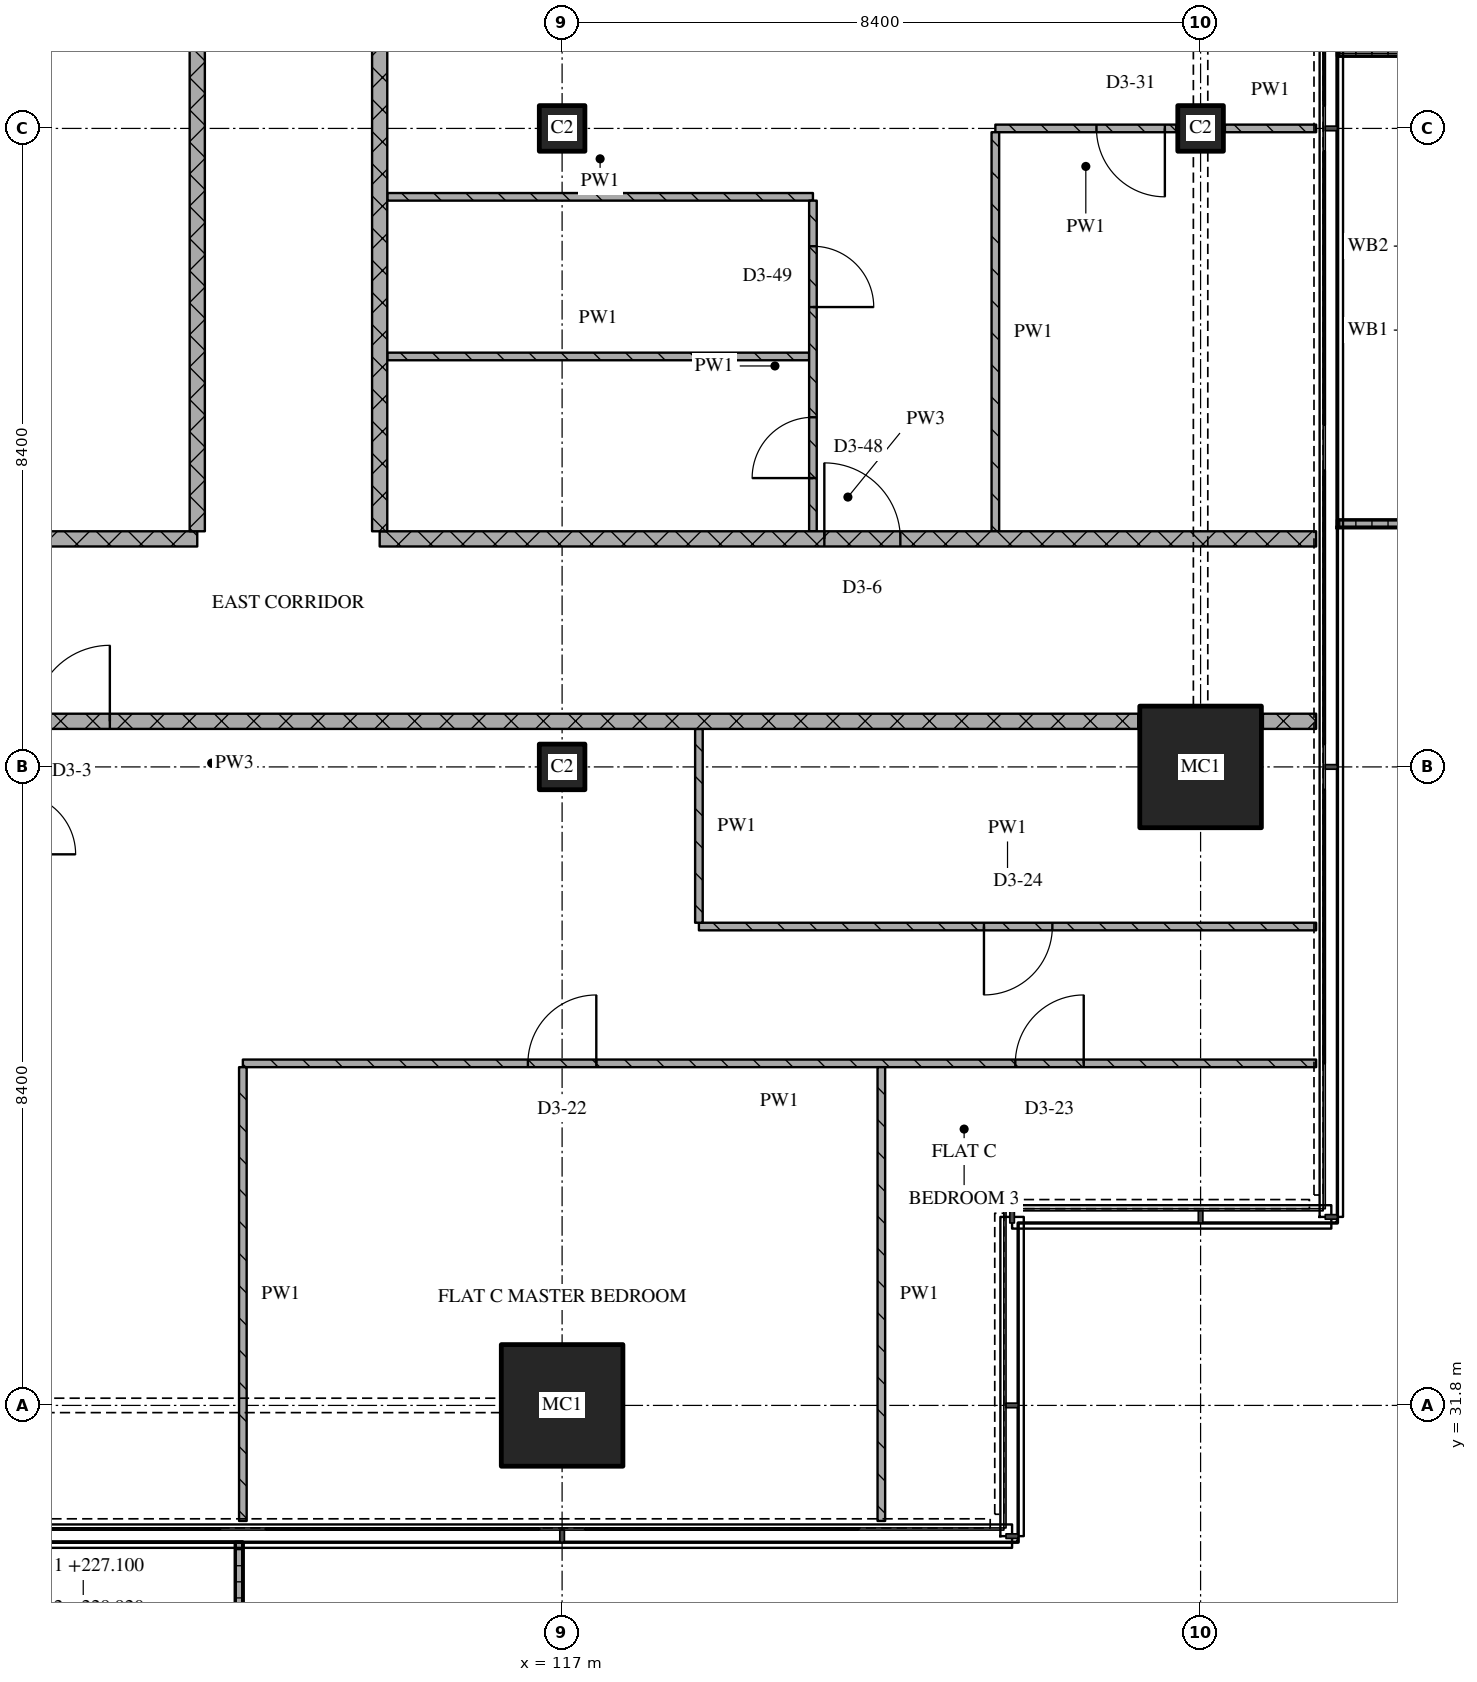
"""IFC4 building model, lengths in metres.
Left out: names, types, materials, properties, quantities, classifications, styles, units other than length and angle.
Written with IfcOpenShell. Run it as: python <this file> out.ifc"""

import sys

from ifc_helpers import new_model, si_unit, direction, frame, frame_2d, origin, origin_2d, place, context, subcontext, project, spatial, polyline, rectangle, outline, extrude, element, fill, save


model = new_model("IFC4")
c1 = context("Model", 3, precision=1e-05, world=origin(), true_north=direction((0.0, 1.0)))
c2 = subcontext(c1, "Body", "Model", "MODEL_VIEW")
j1 = project(units=[si_unit("LENGTHUNIT", "METRE"), si_unit("PLANEANGLEUNIT", "RADIAN")], contexts=[c1])
p1 = place(None, origin())
s1 = spatial("IfcSite", under=j1, at=p1, CompositionType="ELEMENT")
p2 = place(p1, origin())
s2 = spatial("IfcBuilding", under=s1, at=p2, CompositionType="ELEMENT")
p3 = place(p2, frame((0.0, 0.0, 227.1)))
s3 = spatial("IfcBuildingStorey", under=s2, at=p3, CompositionType="ELEMENT", Elevation=227.1)
p4 = place(p3, frame((117.0, 31.8, 0.0), z_axis=(0.0, 0.0, 1.0), x_axis=(1.0, 0.0, 0.0)))
e1 = element("IfcColumn", 1, at=p4, inside=s3, PredefinedType="COLUMN", context=c2, shape_type="SweptSolid", body=[
    extrude(rectangle(XDim=1.6, YDim=1.6, at=origin_2d()), origin(), (0.0, 0.0, 1.0), 3.6),
])
for number, where, z_axis, x_axis in (
    (2, (117.0, 40.2, 0.0), (0.0, 0.0, 1.0), (1.0, 0.0, 0.0)),
    (3, (117.0, 48.6, 0.0), (0.0, 0.0, 1.0), (1.0, 0.0, 0.0)),
):
    element("IfcColumn", number, at=place(p3, frame(where, z_axis=z_axis, x_axis=x_axis)), inside=s3, PredefinedType="COLUMN", context=c2, shape_type="SweptSolid", body=[
        extrude(rectangle(XDim=0.6, YDim=0.6, at=origin_2d()), origin(), (0.0, 0.0, 1.0), 3.6),
    ])
p5 = place(p3, frame((125.4, 40.2, 0.0), z_axis=(0.0, 0.0, 1.0), x_axis=(1.0, 0.0, 0.0)))
e4 = element("IfcColumn", 4, at=p5, inside=s3, PredefinedType="COLUMN", context=c2, shape_type="SweptSolid", body=[
    extrude(rectangle(XDim=1.6, YDim=1.6, at=origin_2d()), origin(), (0.0, 0.0, 1.0), 3.6),
])
p6 = place(p3, frame((125.4, 48.6, 0.0), z_axis=(0.0, 0.0, 1.0), x_axis=(1.0, 0.0, 0.0)))
e5 = element("IfcColumn", 5, at=p6, inside=s3, PredefinedType="COLUMN", context=c2, shape_type="SweptSolid", body=[
    extrude(rectangle(XDim=0.6, YDim=0.6, at=origin_2d()), origin(), (0.0, 0.0, 1.0), 3.6),
])
p7 = place(p3, origin())
e6 = element("IfcWall", 6, at=p7, inside=s3, PredefinedType="SOLIDWALL", context=c2, shape_type="SweptSolid", body=[
    extrude(outline(polyline([(108.6, 30.0), (108.7, 30.0), (108.7, 28.367), (112.7, 28.367), (112.7, 30.0), (112.8, 30.0), (112.8, 28.267), (108.6, 28.267), (108.6, 30.0)])), origin(), (0.0, 0.0, 1.0), 1.0),
])
p8 = place(p3, origin())
e7 = element("IfcWall", 7, at=p8, inside=s3, PredefinedType="SOLIDWALL", context=c2, shape_type="SweptSolid", body=[
    extrude(outline(polyline([(127.2, 43.35), (127.2, 43.45), (128.967, 43.45), (128.967, 49.55), (127.2, 49.55), (127.2, 49.65), (129.067, 49.65), (129.067, 43.35), (127.2, 43.35)])), origin(), (0.0, 0.0, 1.0), 1.0),
])
p9 = place(p3, frame((126.92, 36.3, 0.0), z_axis=(0.0, 0.0, 1.0), x_axis=(-1.0, 0.0, 0.0)))
e8 = element("IfcWall", 8, at=p9, inside=s3, PredefinedType="PARTITIONING", context=c2, shape_type="SweptSolid", body=[
    extrude(rectangle(XDim=14.12, YDim=0.1, at=frame_2d((7.06, 0.0))), origin(), (0.0, 0.0, 1.0), 3.32),
])
p10 = place(p9, frame((3.058, 0.0, 0.0)))
e9 = element("IfcOpeningElement", 9, at=p10, cuts=e8, PredefinedType="OPENING", context=c2, shape_type="SweptSolid", body=[
    extrude(rectangle(XDim=0.9, YDim=2.1, at=frame_2d((0.45, 1.05))), frame((0.0, 0.06, 0.0), z_axis=(0.0, -1.0, 0.0), x_axis=(1.0, 0.0, 0.0)), (0.0, 0.0, 1.0), 0.12),
])
p11 = place(p9, frame((9.47, 0.0, 0.0)))
e10 = element("IfcOpeningElement", 10, at=p11, cuts=e8, PredefinedType="OPENING", context=c2, shape_type="SweptSolid", body=[
    extrude(rectangle(XDim=0.9, YDim=2.1, at=frame_2d((0.45, 1.05))), frame((0.0, 0.06, 0.0), z_axis=(0.0, -1.0, 0.0), x_axis=(1.0, 0.0, 0.0)), (0.0, 0.0, 1.0), 0.12),
])
p12 = place(p3, frame((118.8, 38.1, 0.0), z_axis=(0.0, 0.0, 1.0), x_axis=(1.0, 0.0, 0.0)))
e11 = element("IfcWall", 11, at=p12, inside=s3, PredefinedType="PARTITIONING", context=c2, shape_type="SweptSolid", body=[
    extrude(rectangle(XDim=8.12, YDim=0.1, at=frame_2d((4.06, 0.0))), origin(), (0.0, 0.0, 1.0), 3.32),
])
p13 = place(p12, frame((3.75, 0.0, 0.0)))
e12 = element("IfcOpeningElement", 12, at=p13, cuts=e11, PredefinedType="OPENING", context=c2, shape_type="SweptSolid", body=[
    extrude(rectangle(XDim=0.9, YDim=2.1, at=frame_2d((0.45, 1.05))), frame((0.0, 0.06, 0.0), z_axis=(0.0, -1.0, 0.0), x_axis=(1.0, 0.0, 0.0)), (0.0, 0.0, 1.0), 0.12),
])
p14 = place(p3, frame((124.58, 40.8, 0.0), z_axis=(0.0, 0.0, 1.0), x_axis=(-1.0, 0.0, 0.0)))
e13 = element("IfcWall", 13, at=p14, inside=s3, PredefinedType="PARTITIONING", context=c2, shape_type="SweptSolid", body=[
    extrude(rectangle(XDim=24.38, YDim=0.2, at=frame_2d((12.19, 0.0))), origin(), (0.0, 0.0, 1.0), 3.32),
])
p15 = place(p14, frame((13.53, 0.0, 0.0)))
e14 = element("IfcOpeningElement", 14, at=p15, cuts=e13, PredefinedType="OPENING", context=c2, shape_type="SweptSolid", body=[
    extrude(rectangle(XDim=1.0, YDim=2.1, at=frame_2d((0.5, 1.05))), frame((0.0, 0.11, 0.0), z_axis=(0.0, -1.0, 0.0), x_axis=(1.0, 0.0, 0.0)), (0.0, 0.0, 1.0), 0.22),
])
p16 = place(p3, frame((126.22, 40.8, 0.0), z_axis=(0.0, 0.0, 1.0), x_axis=(1.0, 0.0, 0.0)))
e15 = element("IfcWall", 15, at=p16, inside=s3, PredefinedType="PARTITIONING", context=c2, shape_type="SweptSolid", body=[
    extrude(rectangle(XDim=0.7, YDim=0.2, at=frame_2d((0.35, 0.0))), origin(), (0.0, 0.0, 1.0), 3.32),
])
p17 = place(p3, frame((107.0, 43.2, 0.0), z_axis=(0.0, 0.0, 1.0), x_axis=(1.0, 0.0, 0.0)))
e16 = element("IfcWall", 16, at=p17, inside=s3, PredefinedType="PARTITIONING", context=c2, shape_type="SweptSolid", body=[
    extrude(rectangle(XDim=5.2, YDim=0.2, at=frame_2d((2.6, 0.0))), origin(), (0.0, 0.0, 1.0), 3.32),
])
p18 = place(p17, frame((2.15, 0.0, 0.0)))
e17 = element("IfcOpeningElement", 17, at=p18, cuts=e16, PredefinedType="OPENING", context=c2, shape_type="SweptSolid", body=[
    extrude(rectangle(XDim=0.9, YDim=2.1, at=frame_2d((0.45, 1.05))), frame((0.0, 0.11, 0.0), z_axis=(0.0, -1.0, 0.0), x_axis=(1.0, 0.0, 0.0)), (0.0, 0.0, 1.0), 0.22),
])
p19 = place(p3, frame((114.6, 43.2, 0.0), z_axis=(0.0, 0.0, 1.0), x_axis=(1.0, 0.0, 0.0)))
e18 = element("IfcWall", 18, at=p19, inside=s3, PredefinedType="PARTITIONING", context=c2, shape_type="SweptSolid", body=[
    extrude(rectangle(XDim=12.32, YDim=0.2, at=frame_2d((6.16, 0.0))), origin(), (0.0, 0.0, 1.0), 3.32),
])
p20 = place(p19, frame((5.85, 0.0, 0.0)))
e19 = element("IfcOpeningElement", 19, at=p20, cuts=e18, PredefinedType="OPENING", context=c2, shape_type="SweptSolid", body=[
    extrude(rectangle(XDim=1.0, YDim=2.1, at=frame_2d((0.5, 1.05))), frame((0.0, 0.11, 0.0), z_axis=(0.0, -1.0, 0.0), x_axis=(1.0, 0.0, 0.0)), (0.0, 0.0, 1.0), 0.22),
])
p21 = place(p3, frame((114.7, 45.6, 0.0), z_axis=(0.0, 0.0, 1.0), x_axis=(1.0, 0.0, 0.0)))
e20 = element("IfcWall", 20, at=p21, inside=s3, PredefinedType="PARTITIONING", context=c2, shape_type="SweptSolid", body=[
    extrude(rectangle(XDim=5.55, YDim=0.1, at=frame_2d((2.775, 0.0))), origin(), (0.0, 0.0, 1.0), 3.32),
])
p22 = place(p3, frame((114.7, 47.7, 0.0), z_axis=(0.0, 0.0, 1.0), x_axis=(1.0, 0.0, 0.0)))
e21 = element("IfcWall", 21, at=p22, inside=s3, PredefinedType="PARTITIONING", context=c2, shape_type="SweptSolid", body=[
    extrude(rectangle(XDim=5.6, YDim=0.1, at=frame_2d((2.8, 0.0))), origin(), (0.0, 0.0, 1.0), 3.32),
])
p23 = place(p3, frame((125.08, 48.6, 0.0), z_axis=(0.0, 0.0, 1.0), x_axis=(-1.0, 0.0, 0.0)))
e22 = element("IfcWall", 22, at=p23, inside=s3, PredefinedType="PARTITIONING", context=c2, shape_type="SweptSolid", body=[
    extrude(rectangle(XDim=2.38, YDim=0.1, at=frame_2d((1.19, 0.0))), origin(), (0.0, 0.0, 1.0), 3.32),
])
p24 = place(p23, frame((0.15, 0.0, 0.0)))
e23 = element("IfcOpeningElement", 23, at=p24, cuts=e22, PredefinedType="OPENING", context=c2, shape_type="SweptSolid", body=[
    extrude(rectangle(XDim=0.9, YDim=2.1, at=frame_2d((0.45, 1.05))), frame((0.0, 0.06, 0.0), z_axis=(0.0, -1.0, 0.0), x_axis=(1.0, 0.0, 0.0)), (0.0, 0.0, 1.0), 0.12),
])
p25 = place(p3, frame((125.72, 48.6, 0.0), z_axis=(0.0, 0.0, 1.0), x_axis=(1.0, 0.0, 0.0)))
e24 = element("IfcWall", 24, at=p25, inside=s3, PredefinedType="PARTITIONING", context=c2, shape_type="SweptSolid", body=[
    extrude(rectangle(XDim=1.2, YDim=0.1, at=frame_2d((0.6, 0.0))), origin(), (0.0, 0.0, 1.0), 3.32),
])
p26 = place(p3, frame((112.2, 58.7, 0.0), z_axis=(0.0, 0.0, 1.0), x_axis=(0.0, -1.0, 0.0)))
e25 = element("IfcWall", 25, at=p26, inside=s3, PredefinedType="PARTITIONING", context=c2, shape_type="SweptSolid", body=[
    extrude(rectangle(XDim=15.4, YDim=0.2, at=frame_2d((7.7, 0.0))), origin(), (0.0, 0.0, 1.0), 3.32),
])
p27 = place(p3, frame((112.8, 36.25, 0.0), z_axis=(0.0, 0.0, 1.0), x_axis=(0.0, -1.0, 0.0)))
e26 = element("IfcWall", 26, at=p27, inside=s3, PredefinedType="PARTITIONING", context=c2, shape_type="SweptSolid", body=[
    extrude(rectangle(XDim=5.97, YDim=0.1, at=frame_2d((2.985, 0.0))), origin(), (0.0, 0.0, 1.0), 3.32),
])
p28 = place(p3, frame((114.6, 61.1, 0.0), z_axis=(0.0, 0.0, 1.0), x_axis=(0.0, -1.0, 0.0)))
e27 = element("IfcWall", 27, at=p28, inside=s3, PredefinedType="PARTITIONING", context=c2, shape_type="SweptSolid", body=[
    extrude(rectangle(XDim=17.8, YDim=0.2, at=frame_2d((8.9, 0.0))), origin(), (0.0, 0.0, 1.0), 3.32),
])
p29 = place(p3, frame((118.8, 40.7, 0.0), z_axis=(0.0, 0.0, 1.0), x_axis=(0.0, -1.0, 0.0)))
e28 = element("IfcWall", 28, at=p29, inside=s3, PredefinedType="PARTITIONING", context=c2, shape_type="SweptSolid", body=[
    extrude(rectangle(XDim=2.55, YDim=0.1, at=frame_2d((1.275, 0.0))), origin(), (0.0, 0.0, 1.0), 3.32),
])
p30 = place(p3, frame((120.3, 43.3, 0.0), z_axis=(0.0, 0.0, 1.0), x_axis=(0.0, 1.0, 0.0)))
e29 = element("IfcWall", 29, at=p30, inside=s3, PredefinedType="PARTITIONING", context=c2, shape_type="SweptSolid", body=[
    extrude(rectangle(XDim=4.35, YDim=0.1, at=frame_2d((2.175, 0.0))), origin(), (0.0, 0.0, 1.0), 3.32),
])
p31 = place(p30, frame((0.7, 0.0, 0.0)))
e30 = element("IfcOpeningElement", 30, at=p31, cuts=e29, PredefinedType="OPENING", context=c2, shape_type="SweptSolid", body=[
    extrude(rectangle(XDim=0.8, YDim=2.1, at=frame_2d((0.4, 1.05))), frame((0.0, 0.06, 0.0), z_axis=(0.0, -1.0, 0.0), x_axis=(1.0, 0.0, 0.0)), (0.0, 0.0, 1.0), 0.12),
])
p32 = place(p30, frame((2.95, 0.0, 0.0)))
e31 = element("IfcOpeningElement", 31, at=p32, cuts=e29, PredefinedType="OPENING", context=c2, shape_type="SweptSolid", body=[
    extrude(rectangle(XDim=0.8, YDim=2.1, at=frame_2d((0.4, 1.05))), frame((0.0, 0.06, 0.0), z_axis=(0.0, -1.0, 0.0), x_axis=(1.0, 0.0, 0.0)), (0.0, 0.0, 1.0), 0.12),
])
p33 = place(p3, frame((121.2, 36.25, 0.0), z_axis=(0.0, 0.0, 1.0), x_axis=(0.0, -1.0, 0.0)))
e32 = element("IfcWall", 32, at=p33, inside=s3, PredefinedType="PARTITIONING", context=c2, shape_type="SweptSolid", body=[
    extrude(rectangle(XDim=5.97, YDim=0.1, at=frame_2d((2.985, 0.0))), origin(), (0.0, 0.0, 1.0), 3.32),
])
p34 = place(p3, frame((122.7, 48.55, 0.0), z_axis=(0.0, 0.0, 1.0), x_axis=(0.0, -1.0, 0.0)))
e33 = element("IfcWall", 33, at=p34, inside=s3, PredefinedType="PARTITIONING", context=c2, shape_type="SweptSolid", body=[
    extrude(rectangle(XDim=5.25, YDim=0.1, at=frame_2d((2.625, 0.0))), origin(), (0.0, 0.0, 1.0), 3.32),
])
p35 = place(p10, origin())
e34 = element("IfcDoor", 34, at=p35, inside=s3, OperationType="SINGLE_SWING_RIGHT", PredefinedType="DOOR", context=c2, shape_type="SweptSolid", body=[
    extrude(rectangle(XDim=0.9, YDim=2.1, at=frame_2d((0.45, 1.05))), frame((0.0, 0.025, 0.0), z_axis=(0.0, -1.0, 0.0), x_axis=(1.0, 0.0, 0.0)), (0.0, 0.0, 1.0), 0.05),
])
fill(e9, e34)
p36 = place(p11, origin())
e35 = element("IfcDoor", 35, at=p36, inside=s3, OperationType="SINGLE_SWING_RIGHT", PredefinedType="DOOR", context=c2, shape_type="SweptSolid", body=[
    extrude(rectangle(XDim=0.9, YDim=2.1, at=frame_2d((0.45, 1.05))), frame((0.0, 0.025, 0.0), z_axis=(0.0, -1.0, 0.0), x_axis=(1.0, 0.0, 0.0)), (0.0, 0.0, 1.0), 0.05),
])
fill(e10, e35)
p37 = place(p13, origin())
e36 = element("IfcDoor", 36, at=p37, inside=s3, OperationType="SINGLE_SWING_RIGHT", PredefinedType="DOOR", context=c2, shape_type="SweptSolid", body=[
    extrude(rectangle(XDim=0.9, YDim=2.1, at=frame_2d((0.45, 1.05))), frame((0.0, 0.025, 0.0), z_axis=(0.0, -1.0, 0.0), x_axis=(1.0, 0.0, 0.0)), (0.0, 0.0, 1.0), 0.05),
])
fill(e12, e36)
p38 = place(p15, origin())
e37 = element("IfcDoor", 37, at=p38, inside=s3, OperationType="SINGLE_SWING_RIGHT", PredefinedType="DOOR", context=c2, shape_type="SweptSolid", body=[
    extrude(rectangle(XDim=1.0, YDim=2.1, at=frame_2d((0.5, 1.05))), frame((0.0, 0.025, 0.0), z_axis=(0.0, -1.0, 0.0), x_axis=(1.0, 0.0, 0.0)), (0.0, 0.0, 1.0), 0.05),
])
fill(e14, e37)
p39 = place(p20, origin())
e38 = element("IfcDoor", 38, at=p39, inside=s3, OperationType="SINGLE_SWING_LEFT", PredefinedType="DOOR", context=c2, shape_type="SweptSolid", body=[
    extrude(rectangle(XDim=1.0, YDim=2.1, at=frame_2d((0.5, 1.05))), frame((0.0, 0.025, 0.0), z_axis=(0.0, -1.0, 0.0), x_axis=(1.0, 0.0, 0.0)), (0.0, 0.0, 1.0), 0.05),
])
fill(e19, e38)
p40 = place(p24, origin())
e39 = element("IfcDoor", 39, at=p40, inside=s3, OperationType="SINGLE_SWING_LEFT", PredefinedType="DOOR", context=c2, shape_type="SweptSolid", body=[
    extrude(rectangle(XDim=0.9, YDim=2.1, at=frame_2d((0.45, 1.05))), frame((0.0, 0.025, 0.0), z_axis=(0.0, -1.0, 0.0), x_axis=(1.0, 0.0, 0.0)), (0.0, 0.0, 1.0), 0.05),
])
fill(e23, e39)
p41 = place(p31, origin())
e40 = element("IfcDoor", 40, at=p41, inside=s3, OperationType="SINGLE_SWING_LEFT", PredefinedType="DOOR", context=c2, shape_type="SweptSolid", body=[
    extrude(rectangle(XDim=0.8, YDim=2.1, at=frame_2d((0.4, 1.05))), frame((0.0, 0.025, 0.0), z_axis=(0.0, -1.0, 0.0), x_axis=(1.0, 0.0, 0.0)), (0.0, 0.0, 1.0), 0.05),
])
fill(e30, e40)
p42 = place(p32, origin())
e41 = element("IfcDoor", 41, at=p42, inside=s3, OperationType="SINGLE_SWING_RIGHT", PredefinedType="DOOR", context=c2, shape_type="SweptSolid", body=[
    extrude(rectangle(XDim=0.8, YDim=2.1, at=frame_2d((0.4, 1.05))), frame((0.0, 0.025, 0.0), z_axis=(0.0, -1.0, 0.0), x_axis=(1.0, 0.0, 0.0)), (0.0, 0.0, 1.0), 0.05),
])
fill(e31, e41)
save(model, sys.argv[1])
